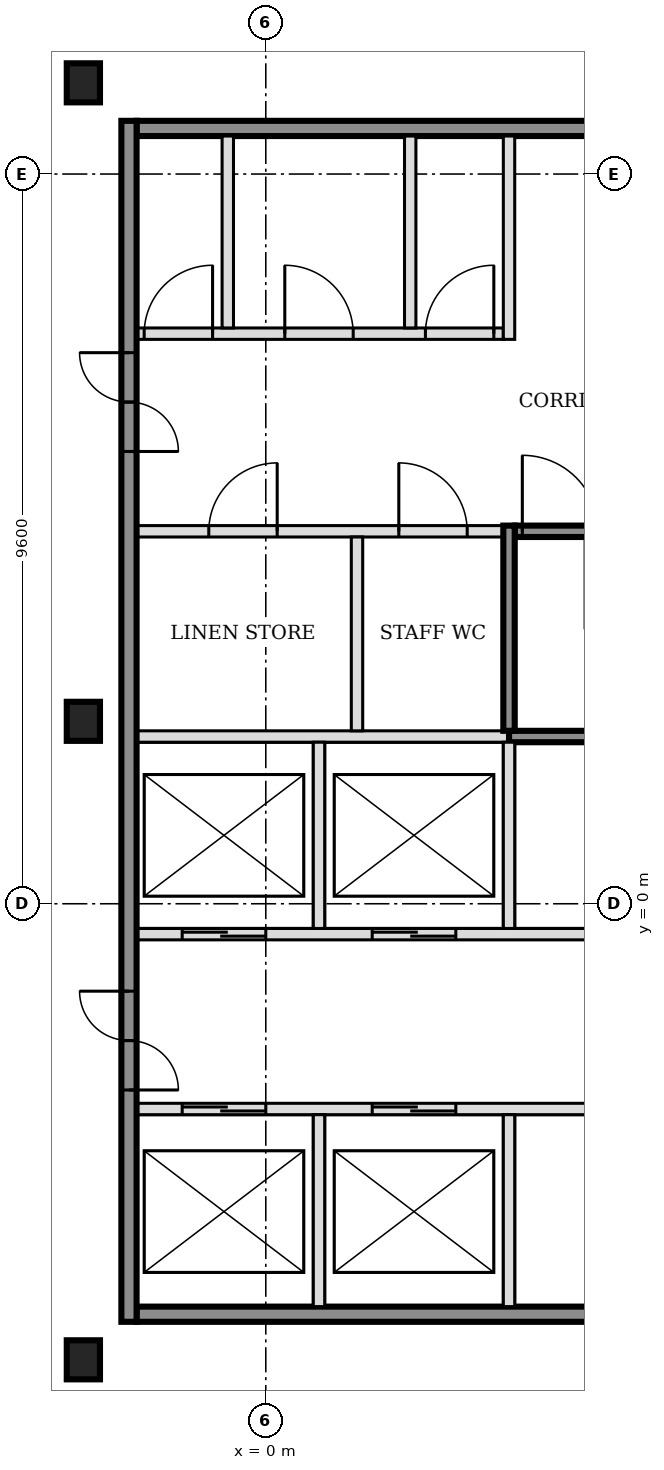
"""IFC4 building model, lengths in metres.
Left out: names, types, materials, properties, quantities, classifications, styles, units other than length and angle.
Written with IfcOpenShell. Run it as: python <this file> out.ifc"""

import sys

from ifc_helpers import new_model, si_unit, direction, frame, frame_2d, origin, origin_2d, place, context, subcontext, project, spatial, rectangle, i_section, extrude, element, fill, save


model = new_model("IFC4")
c1 = context("Model", 3, precision=1e-05, world=origin(), true_north=direction((0.0, 1.0)))
c2 = subcontext(c1, "Body", "Model", "MODEL_VIEW")
j1 = project(units=[si_unit("LENGTHUNIT", "METRE"), si_unit("PLANEANGLEUNIT", "RADIAN")], contexts=[c1])
p1 = place(None, origin())
s1 = spatial("IfcSite", under=j1, at=p1, CompositionType="ELEMENT")
p2 = place(p1, origin())
s2 = spatial("IfcBuilding", under=s1, at=p2, CompositionType="ELEMENT")
p3 = place(p2, frame((0.0, 0.0, 94.2)))
s3 = spatial("IfcBuildingStorey", under=s2, at=p3, CompositionType="ELEMENT", Elevation=94.2)
for number, where, z_axis, x_axis in (
    (1, (-2.4, -6.0, -0.15), (0.0, 0.0, 1.0), (1.0, 0.0, 0.0)),
    (2, (-2.4, 2.4, -0.15), (0.0, 0.0, 1.0), (1.0, 0.0, 0.0)),
    (3, (-2.4, 10.8, -0.15), (0.0, 0.0, 1.0), (1.0, 0.0, 0.0)),
):
    element("IfcColumn", number, at=place(p3, frame(where, z_axis=z_axis, x_axis=x_axis)), inside=s3, PredefinedType="COLUMN", context=c2, shape_type="SweptSolid", body=[
        extrude(i_section(OverallWidth=0.437, OverallDepth=0.514, WebThickness=0.061, FlangeThickness=0.097, FilletRadius=0.015, at=origin_2d()), origin(), (0.0, 0.0, 1.0), 3.6),
    ])
p4 = place(p3, frame((-1.7, -5.4, 0.0), z_axis=(0.0, 0.0, 1.0), x_axis=(1.0, 0.0, 0.0)))
e4 = element("IfcWall", 4, at=p4, inside=s3, PredefinedType="SOLIDWALL", context=c2, shape_type="SweptSolid", body=[
    extrude(rectangle(XDim=7.9, YDim=0.2, at=frame_2d((3.95, 0.0))), origin(), (0.0, 0.0, 1.0), 3.45),
])
p5 = place(p3, frame((-1.7, -2.7, 0.0), z_axis=(0.0, 0.0, 1.0), x_axis=(1.0, 0.0, 0.0)))
e5 = element("IfcWall", 5, at=p5, inside=s3, PredefinedType="SOLIDWALL", context=c2, shape_type="SweptSolid", body=[
    extrude(rectangle(XDim=7.9, YDim=0.15, at=frame_2d((3.95, 0.0))), origin(), (0.0, 0.0, 1.0), 3.45),
])
p6 = place(p5, frame((0.6, 0.0, 0.0)))
e6 = element("IfcOpeningElement", 6, at=p6, cuts=e5, PredefinedType="OPENING", context=c2, shape_type="SweptSolid", body=[
    extrude(rectangle(XDim=1.1, YDim=2.1, at=frame_2d((0.55, 1.05))), frame((0.0, 0.085, 0.0), z_axis=(0.0, -1.0, 0.0), x_axis=(1.0, 0.0, 0.0)), (0.0, 0.0, 1.0), 0.17),
])
p7 = place(p5, frame((3.1, 0.0, 0.0)))
e7 = element("IfcOpeningElement", 7, at=p7, cuts=e5, PredefinedType="OPENING", context=c2, shape_type="SweptSolid", body=[
    extrude(rectangle(XDim=1.1, YDim=2.1, at=frame_2d((0.55, 1.05))), frame((0.0, 0.085, 0.0), z_axis=(0.0, -1.0, 0.0), x_axis=(1.0, 0.0, 0.0)), (0.0, 0.0, 1.0), 0.17),
])
p8 = place(p3, frame((-1.7, -0.4, 0.0), z_axis=(0.0, 0.0, 1.0), x_axis=(1.0, 0.0, 0.0)))
e8 = element("IfcWall", 8, at=p8, inside=s3, PredefinedType="SOLIDWALL", context=c2, shape_type="SweptSolid", body=[
    extrude(rectangle(XDim=15.925, YDim=0.15, at=frame_2d((7.962, 0.0))), origin(), (0.0, 0.0, 1.0), 3.45),
])
p9 = place(p8, frame((0.6, 0.0, 0.0)))
e9 = element("IfcOpeningElement", 9, at=p9, cuts=e8, PredefinedType="OPENING", context=c2, shape_type="SweptSolid", body=[
    extrude(rectangle(XDim=1.1, YDim=2.1, at=frame_2d((0.55, 1.05))), frame((0.0, 0.085, 0.0), z_axis=(0.0, -1.0, 0.0), x_axis=(1.0, 0.0, 0.0)), (0.0, 0.0, 1.0), 0.17),
])
p10 = place(p8, frame((3.1, 0.0, 0.0)))
e10 = element("IfcOpeningElement", 10, at=p10, cuts=e8, PredefinedType="OPENING", context=c2, shape_type="SweptSolid", body=[
    extrude(rectangle(XDim=1.1, YDim=2.1, at=frame_2d((0.55, 1.05))), frame((0.0, 0.085, 0.0), z_axis=(0.0, -1.0, 0.0), x_axis=(1.0, 0.0, 0.0)), (0.0, 0.0, 1.0), 0.17),
])
p11 = place(p8, frame((11.575, 0.0, 0.0)))
e11 = element("IfcOpeningElement", 11, at=p11, cuts=e8, PredefinedType="OPENING", context=c2, shape_type="SweptSolid", body=[
    extrude(rectangle(XDim=1.2, YDim=2.1, at=frame_2d((0.6, 1.05))), frame((0.0, 0.085, 0.0), z_axis=(0.0, -1.0, 0.0), x_axis=(1.0, 0.0, 0.0)), (0.0, 0.0, 1.0), 0.17),
])
p12 = place(p8, frame((14.125, 0.0, 0.0)))
e12 = element("IfcOpeningElement", 12, at=p12, cuts=e8, PredefinedType="OPENING", context=c2, shape_type="SweptSolid", body=[
    extrude(rectangle(XDim=1.2, YDim=2.1, at=frame_2d((0.6, 1.05))), frame((0.0, 0.085, 0.0), z_axis=(0.0, -1.0, 0.0), x_axis=(1.0, 0.0, 0.0)), (0.0, 0.0, 1.0), 0.17),
])
p13 = place(p3, frame((-1.7, 2.2, 0.0), z_axis=(0.0, 0.0, 1.0), x_axis=(1.0, 0.0, 0.0)))
e13 = element("IfcWall", 13, at=p13, inside=s3, PredefinedType="SOLIDWALL", context=c2, shape_type="SweptSolid", body=[
    extrude(rectangle(XDim=4.9, YDim=0.15, at=frame_2d((2.45, 0.0))), origin(), (0.0, 0.0, 1.0), 3.45),
])
p14 = place(p3, frame((3.2, 2.2, 0.0), z_axis=(0.0, 0.0, 1.0), x_axis=(1.0, 0.0, 0.0)))
e14 = element("IfcWall", 14, at=p14, inside=s3, PredefinedType="SOLIDWALL", context=c2, shape_type="SweptSolid", body=[
    extrude(rectangle(XDim=6.5, YDim=0.15, at=frame_2d((3.25, 0.0))), origin(), (0.0, 0.0, 1.0), 3.45),
])
p15 = place(p3, frame((-1.7, 4.9, 0.0), z_axis=(0.0, 0.0, 1.0), x_axis=(1.0, 0.0, 0.0)))
e15 = element("IfcWall", 15, at=p15, inside=s3, PredefinedType="PARTITIONING", context=c2, shape_type="SweptSolid", body=[
    extrude(rectangle(XDim=4.825, YDim=0.15, at=frame_2d((2.413, 0.0))), origin(), (0.0, 0.0, 1.0), 3.45),
])
p16 = place(p15, frame((0.95, 0.0, 0.0)))
e16 = element("IfcOpeningElement", 16, at=p16, cuts=e15, PredefinedType="OPENING", context=c2, shape_type="SweptSolid", body=[
    extrude(rectangle(XDim=0.9, YDim=2.1, at=frame_2d((0.45, 1.05))), frame((0.0, 0.085, 0.0), z_axis=(0.0, -1.0, 0.0), x_axis=(1.0, 0.0, 0.0)), (0.0, 0.0, 1.0), 0.17),
])
p17 = place(p15, frame((3.45, 0.0, 0.0)))
e17 = element("IfcOpeningElement", 17, at=p17, cuts=e15, PredefinedType="OPENING", context=c2, shape_type="SweptSolid", body=[
    extrude(rectangle(XDim=0.9, YDim=2.1, at=frame_2d((0.45, 1.05))), frame((0.0, 0.085, 0.0), z_axis=(0.0, -1.0, 0.0), x_axis=(1.0, 0.0, 0.0)), (0.0, 0.0, 1.0), 0.17),
])
p18 = place(p3, frame((3.275, 4.9, 0.0), z_axis=(0.0, 0.0, 1.0), x_axis=(1.0, 0.0, 0.0)))
e18 = element("IfcWall", 18, at=p18, inside=s3, PredefinedType="SOLIDWALL", context=c2, shape_type="SweptSolid", body=[
    extrude(rectangle(XDim=6.425, YDim=0.15, at=frame_2d((3.212, 0.0))), origin(), (0.0, 0.0, 1.0), 3.45),
])
p19 = place(p18, frame((0.1, 0.0, 0.0)))
e19 = element("IfcOpeningElement", 19, at=p19, cuts=e18, PredefinedType="OPENING", context=c2, shape_type="SweptSolid", body=[
    extrude(rectangle(XDim=1.0, YDim=2.1, at=frame_2d((0.5, 1.05))), frame((0.0, 0.085, 0.0), z_axis=(0.0, -1.0, 0.0), x_axis=(1.0, 0.0, 0.0)), (0.0, 0.0, 1.0), 0.17),
])
p20 = place(p3, frame((-1.7, 7.5, 0.0), z_axis=(0.0, 0.0, 1.0), x_axis=(1.0, 0.0, 0.0)))
e20 = element("IfcWall", 20, at=p20, inside=s3, PredefinedType="PARTITIONING", context=c2, shape_type="SweptSolid", body=[
    extrude(rectangle(XDim=4.825, YDim=0.15, at=frame_2d((2.413, 0.0))), origin(), (0.0, 0.0, 1.0), 3.45),
])
p21 = place(p20, frame((0.1, 0.0, 0.0)))
e21 = element("IfcOpeningElement", 21, at=p21, cuts=e20, PredefinedType="OPENING", context=c2, shape_type="SweptSolid", body=[
    extrude(rectangle(XDim=0.9, YDim=2.1, at=frame_2d((0.45, 1.05))), frame((0.0, 0.085, 0.0), z_axis=(0.0, -1.0, 0.0), x_axis=(1.0, 0.0, 0.0)), (0.0, 0.0, 1.0), 0.17),
])
p22 = place(p20, frame((1.95, 0.0, 0.0)))
e22 = element("IfcOpeningElement", 22, at=p22, cuts=e20, PredefinedType="OPENING", context=c2, shape_type="SweptSolid", body=[
    extrude(rectangle(XDim=0.9, YDim=2.1, at=frame_2d((0.45, 1.05))), frame((0.0, 0.085, 0.0), z_axis=(0.0, -1.0, 0.0), x_axis=(1.0, 0.0, 0.0)), (0.0, 0.0, 1.0), 0.17),
])
p23 = place(p20, frame((3.8, 0.0, 0.0)))
e23 = element("IfcOpeningElement", 23, at=p23, cuts=e20, PredefinedType="OPENING", context=c2, shape_type="SweptSolid", body=[
    extrude(rectangle(XDim=0.9, YDim=2.1, at=frame_2d((0.45, 1.05))), frame((0.0, 0.085, 0.0), z_axis=(0.0, -1.0, 0.0), x_axis=(1.0, 0.0, 0.0)), (0.0, 0.0, 1.0), 0.17),
])
p24 = place(p3, frame((-1.7, 10.2, 0.0), z_axis=(0.0, 0.0, 1.0), x_axis=(1.0, 0.0, 0.0)))
e24 = element("IfcWall", 24, at=p24, inside=s3, PredefinedType="SOLIDWALL", context=c2, shape_type="SweptSolid", body=[
    extrude(rectangle(XDim=7.9, YDim=0.2, at=frame_2d((3.95, 0.0))), origin(), (0.0, 0.0, 1.0), 3.45),
])
p25 = place(p3, frame((-1.8, -5.5, 0.0), z_axis=(0.0, 0.0, 1.0), x_axis=(0.0, 1.0, 0.0)))
e25 = element("IfcWall", 25, at=p25, inside=s3, PredefinedType="SOLIDWALL", context=c2, shape_type="SweptSolid", body=[
    extrude(rectangle(XDim=15.8, YDim=0.2, at=frame_2d((7.9, 0.0))), origin(), (0.0, 0.0, 1.0), 3.45),
])
p26 = place(p25, frame((3.05, 0.0, 0.0)))
e26 = element("IfcOpeningElement", 26, at=p26, cuts=e25, PredefinedType="OPENING", context=c2, shape_type="SweptSolid", body=[
    extrude(rectangle(XDim=1.3, YDim=2.1, at=frame_2d((0.65, 1.05))), frame((0.0, 0.11, 0.0), z_axis=(0.0, -1.0, 0.0), x_axis=(1.0, 0.0, 0.0)), (0.0, 0.0, 1.0), 0.22),
])
p27 = place(p25, frame((11.45, 0.0, 0.0)))
e27 = element("IfcOpeningElement", 27, at=p27, cuts=e25, PredefinedType="OPENING", context=c2, shape_type="SweptSolid", body=[
    extrude(rectangle(XDim=1.3, YDim=2.1, at=frame_2d((0.65, 1.05))), frame((0.0, 0.11, 0.0), z_axis=(0.0, -1.0, 0.0), x_axis=(1.0, 0.0, 0.0)), (0.0, 0.0, 1.0), 0.22),
])
p28 = place(p3, frame((-0.5, 7.575, 0.0), z_axis=(0.0, 0.0, 1.0), x_axis=(0.0, 1.0, 0.0)))
e28 = element("IfcWall", 28, at=p28, inside=s3, PredefinedType="PARTITIONING", context=c2, shape_type="SweptSolid", body=[
    extrude(rectangle(XDim=2.525, YDim=0.15, at=frame_2d((1.263, 0.0))), origin(), (0.0, 0.0, 1.0), 3.45),
])
p29 = place(p3, frame((0.7, -5.3, 0.0), z_axis=(0.0, 0.0, 1.0), x_axis=(0.0, 1.0, 0.0)))
e29 = element("IfcWall", 29, at=p29, inside=s3, PredefinedType="SOLIDWALL", context=c2, shape_type="SweptSolid", body=[
    extrude(rectangle(XDim=2.525, YDim=0.15, at=frame_2d((1.263, 0.0))), origin(), (0.0, 0.0, 1.0), 3.45),
])
p30 = place(p3, frame((0.7, -0.325, 0.0), z_axis=(0.0, 0.0, 1.0), x_axis=(0.0, 1.0, 0.0)))
e30 = element("IfcWall", 30, at=p30, inside=s3, PredefinedType="SOLIDWALL", context=c2, shape_type="SweptSolid", body=[
    extrude(rectangle(XDim=2.45, YDim=0.15, at=frame_2d((1.225, 0.0))), origin(), (0.0, 0.0, 1.0), 3.45),
])
p31 = place(p3, frame((1.2, 2.275, 0.0), z_axis=(0.0, 0.0, 1.0), x_axis=(0.0, 1.0, 0.0)))
e31 = element("IfcWall", 31, at=p31, inside=s3, PredefinedType="PARTITIONING", context=c2, shape_type="SweptSolid", body=[
    extrude(rectangle(XDim=2.55, YDim=0.15, at=frame_2d((1.275, 0.0))), origin(), (0.0, 0.0, 1.0), 3.45),
])
p32 = place(p3, frame((1.9, 7.575, 0.0), z_axis=(0.0, 0.0, 1.0), x_axis=(0.0, 1.0, 0.0)))
e32 = element("IfcWall", 32, at=p32, inside=s3, PredefinedType="PARTITIONING", context=c2, shape_type="SweptSolid", body=[
    extrude(rectangle(XDim=2.525, YDim=0.15, at=frame_2d((1.263, 0.0))), origin(), (0.0, 0.0, 1.0), 3.45),
])
p33 = place(p3, frame((3.2, -5.3, 0.0), z_axis=(0.0, 0.0, 1.0), x_axis=(0.0, 1.0, 0.0)))
e33 = element("IfcWall", 33, at=p33, inside=s3, PredefinedType="SOLIDWALL", context=c2, shape_type="SweptSolid", body=[
    extrude(rectangle(XDim=2.525, YDim=0.15, at=frame_2d((1.263, 0.0))), origin(), (0.0, 0.0, 1.0), 3.45),
])
p34 = place(p3, frame((3.2, -0.325, 0.0), z_axis=(0.0, 0.0, 1.0), x_axis=(0.0, 1.0, 0.0)))
e34 = element("IfcWall", 34, at=p34, inside=s3, PredefinedType="SOLIDWALL", context=c2, shape_type="SweptSolid", body=[
    extrude(rectangle(XDim=2.45, YDim=0.15, at=frame_2d((1.225, 0.0))), origin(), (0.0, 0.0, 1.0), 3.45),
])
p35 = place(p3, frame((3.2, 2.275, 0.0), z_axis=(0.0, 0.0, 1.0), x_axis=(0.0, 1.0, 0.0)))
e35 = element("IfcWall", 35, at=p35, inside=s3, PredefinedType="SOLIDWALL", context=c2, shape_type="SweptSolid", body=[
    extrude(rectangle(XDim=2.7, YDim=0.15, at=frame_2d((1.35, 0.0))), origin(), (0.0, 0.0, 1.0), 3.45),
])
p36 = place(p3, frame((3.2, 7.425, 0.0), z_axis=(0.0, 0.0, 1.0), x_axis=(0.0, 1.0, 0.0)))
e36 = element("IfcWall", 36, at=p36, inside=s3, PredefinedType="PARTITIONING", context=c2, shape_type="SweptSolid", body=[
    extrude(rectangle(XDim=2.675, YDim=0.15, at=frame_2d((1.337, 0.0))), origin(), (0.0, 0.0, 1.0), 3.45),
])
p37 = place(p6, origin())
e37 = element("IfcDoor", 37, at=p37, inside=s3, OperationType="DOUBLE_DOOR_SLIDING", PredefinedType="DOOR", context=c2, shape_type="SweptSolid", body=[
    extrude(rectangle(XDim=1.1, YDim=2.1, at=frame_2d((0.55, 1.05))), frame((0.0, 0.025, 0.0), z_axis=(0.0, -1.0, 0.0), x_axis=(1.0, 0.0, 0.0)), (0.0, 0.0, 1.0), 0.05),
])
fill(e6, e37)
p38 = place(p7, origin())
e38 = element("IfcDoor", 38, at=p38, inside=s3, OperationType="DOUBLE_DOOR_SLIDING", PredefinedType="DOOR", context=c2, shape_type="SweptSolid", body=[
    extrude(rectangle(XDim=1.1, YDim=2.1, at=frame_2d((0.55, 1.05))), frame((0.0, 0.025, 0.0), z_axis=(0.0, -1.0, 0.0), x_axis=(1.0, 0.0, 0.0)), (0.0, 0.0, 1.0), 0.05),
])
fill(e7, e38)
p39 = place(p9, origin())
e39 = element("IfcDoor", 39, at=p39, inside=s3, OperationType="DOUBLE_DOOR_SLIDING", PredefinedType="DOOR", context=c2, shape_type="SweptSolid", body=[
    extrude(rectangle(XDim=1.1, YDim=2.1, at=frame_2d((0.55, 1.05))), frame((0.0, 0.025, 0.0), z_axis=(0.0, -1.0, 0.0), x_axis=(1.0, 0.0, 0.0)), (0.0, 0.0, 1.0), 0.05),
])
fill(e9, e39)
p40 = place(p10, origin())
e40 = element("IfcDoor", 40, at=p40, inside=s3, OperationType="DOUBLE_DOOR_SLIDING", PredefinedType="DOOR", context=c2, shape_type="SweptSolid", body=[
    extrude(rectangle(XDim=1.1, YDim=2.1, at=frame_2d((0.55, 1.05))), frame((0.0, 0.025, 0.0), z_axis=(0.0, -1.0, 0.0), x_axis=(1.0, 0.0, 0.0)), (0.0, 0.0, 1.0), 0.05),
])
fill(e10, e40)
p41 = place(p19, origin())
e41 = element("IfcDoor", 41, at=p41, inside=s3, OperationType="SINGLE_SWING_LEFT", PredefinedType="DOOR", context=c2, shape_type="SweptSolid", body=[
    extrude(rectangle(XDim=1.0, YDim=2.1, at=frame_2d((0.5, 1.05))), frame((0.0, 0.025, 0.0), z_axis=(0.0, -1.0, 0.0), x_axis=(1.0, 0.0, 0.0)), (0.0, 0.0, 1.0), 0.05),
])
fill(e19, e41)
p42 = place(p26, origin())
e42 = element("IfcDoor", 42, at=p42, inside=s3, OperationType="DOUBLE_DOOR_SINGLE_SWING", PredefinedType="DOOR", context=c2, shape_type="SweptSolid", body=[
    extrude(rectangle(XDim=1.3, YDim=2.1, at=frame_2d((0.65, 1.05))), frame((0.0, 0.025, 0.0), z_axis=(0.0, -1.0, 0.0), x_axis=(1.0, 0.0, 0.0)), (0.0, 0.0, 1.0), 0.05),
])
fill(e26, e42)
p43 = place(p27, origin())
e43 = element("IfcDoor", 43, at=p43, inside=s3, OperationType="DOUBLE_DOOR_SINGLE_SWING", PredefinedType="DOOR", context=c2, shape_type="SweptSolid", body=[
    extrude(rectangle(XDim=1.3, YDim=2.1, at=frame_2d((0.65, 1.05))), frame((0.0, 0.025, 0.0), z_axis=(0.0, -1.0, 0.0), x_axis=(1.0, 0.0, 0.0)), (0.0, 0.0, 1.0), 0.05),
])
fill(e27, e43)
p44 = place(p16, origin())
e44 = element("IfcDoor", 44, at=p44, inside=s3, OperationType="SINGLE_SWING_RIGHT", PredefinedType="DOOR", context=c2, shape_type="SweptSolid", body=[
    extrude(rectangle(XDim=0.9, YDim=2.1, at=frame_2d((0.45, 1.05))), frame((0.0, 0.025, 0.0), z_axis=(0.0, -1.0, 0.0), x_axis=(1.0, 0.0, 0.0)), (0.0, 0.0, 1.0), 0.05),
])
fill(e16, e44)
p45 = place(p17, origin())
e45 = element("IfcDoor", 45, at=p45, inside=s3, OperationType="SINGLE_SWING_LEFT", PredefinedType="DOOR", context=c2, shape_type="SweptSolid", body=[
    extrude(rectangle(XDim=0.9, YDim=2.1, at=frame_2d((0.45, 1.05))), frame((0.0, 0.025, 0.0), z_axis=(0.0, -1.0, 0.0), x_axis=(1.0, 0.0, 0.0)), (0.0, 0.0, 1.0), 0.05),
])
fill(e17, e45)
p46 = place(p21, origin())
e46 = element("IfcDoor", 46, at=p46, inside=s3, OperationType="SINGLE_SWING_RIGHT", PredefinedType="DOOR", context=c2, shape_type="SweptSolid", body=[
    extrude(rectangle(XDim=0.9, YDim=2.1, at=frame_2d((0.45, 1.05))), frame((0.0, 0.025, 0.0), z_axis=(0.0, -1.0, 0.0), x_axis=(1.0, 0.0, 0.0)), (0.0, 0.0, 1.0), 0.05),
])
fill(e21, e46)
p47 = place(p22, origin())
e47 = element("IfcDoor", 47, at=p47, inside=s3, OperationType="SINGLE_SWING_LEFT", PredefinedType="DOOR", context=c2, shape_type="SweptSolid", body=[
    extrude(rectangle(XDim=0.9, YDim=2.1, at=frame_2d((0.45, 1.05))), frame((0.0, 0.025, 0.0), z_axis=(0.0, -1.0, 0.0), x_axis=(1.0, 0.0, 0.0)), (0.0, 0.0, 1.0), 0.05),
])
fill(e22, e47)
p48 = place(p23, origin())
e48 = element("IfcDoor", 48, at=p48, inside=s3, OperationType="SINGLE_SWING_RIGHT", PredefinedType="DOOR", context=c2, shape_type="SweptSolid", body=[
    extrude(rectangle(XDim=0.9, YDim=2.1, at=frame_2d((0.45, 1.05))), frame((0.0, 0.025, 0.0), z_axis=(0.0, -1.0, 0.0), x_axis=(1.0, 0.0, 0.0)), (0.0, 0.0, 1.0), 0.05),
])
fill(e23, e48)
save(model, sys.argv[1])
